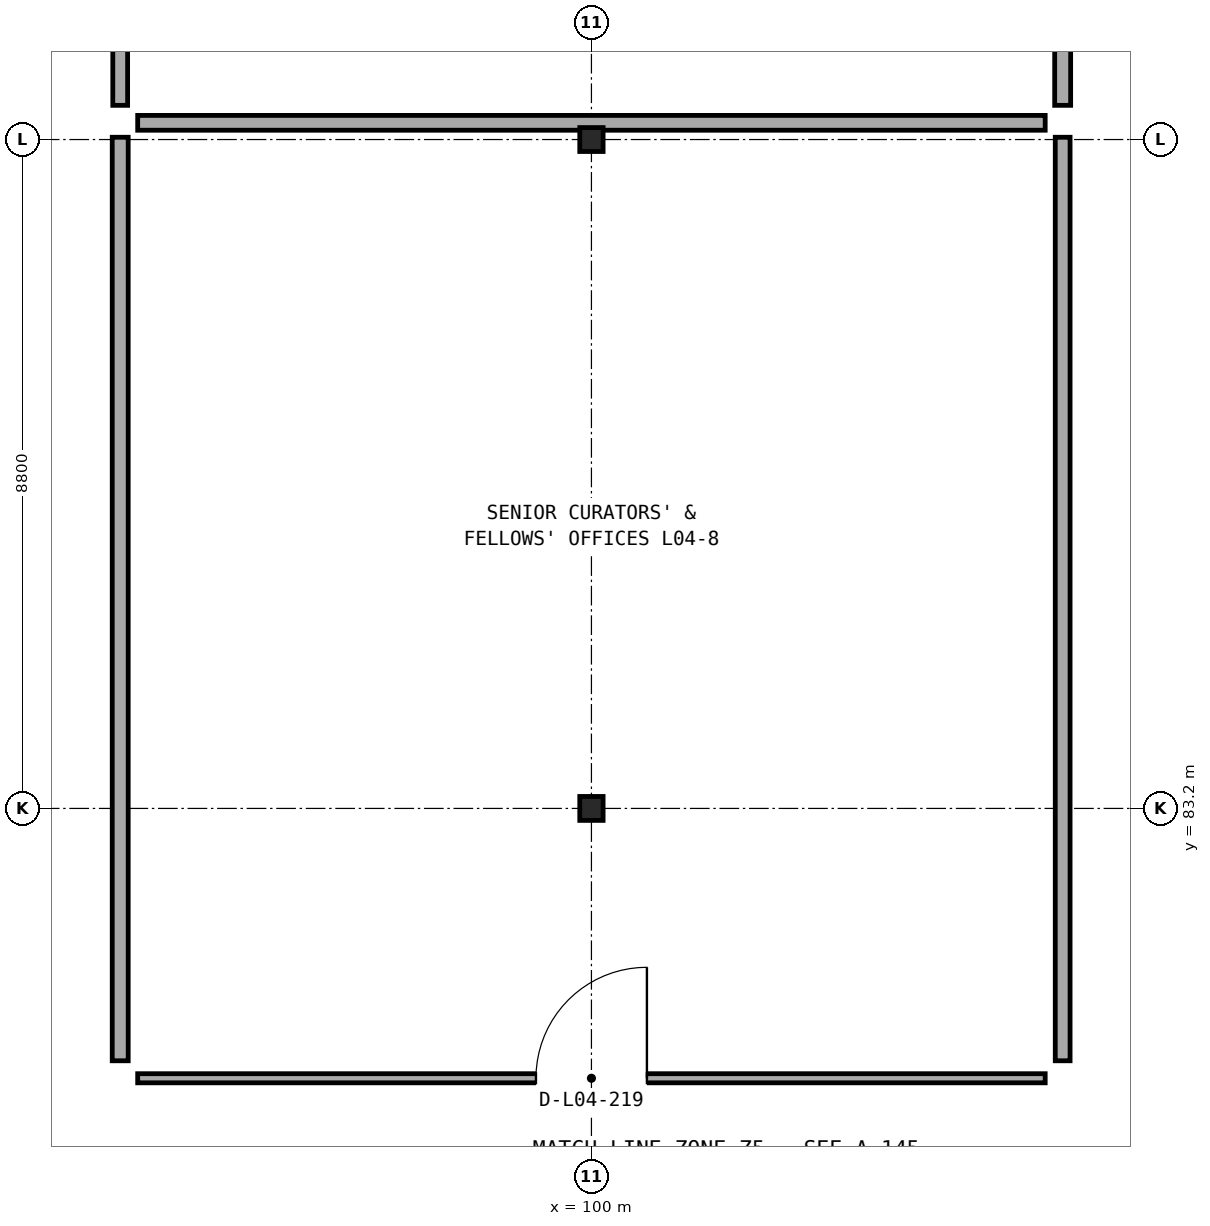
"""IFC4 building model, lengths in metres.
Left out: names, types, materials, properties, quantities, classifications, styles, units other than length and angle.
Written with IfcOpenShell. Run it as: python <this file> out.ifc"""

import sys

from ifc_helpers import new_model, si_unit, direction, frame, frame_2d, origin, origin_2d, place, context, subcontext, project, spatial, rectangle, i_section, extrude, element, fill, save


model = new_model("IFC4")
c1 = context("Model", 3, precision=1e-05, world=origin(), true_north=direction((0.0, 1.0)))
c2 = subcontext(c1, "Body", "Model", "MODEL_VIEW")
j1 = project(units=[si_unit("LENGTHUNIT", "METRE"), si_unit("PLANEANGLEUNIT", "RADIAN")], contexts=[c1])
p1 = place(None, origin())
s1 = spatial("IfcSite", under=j1, at=p1, CompositionType="ELEMENT")
p2 = place(p1, origin())
s2 = spatial("IfcBuilding", under=s1, at=p2, CompositionType="ELEMENT")
p3 = place(p2, frame((0.0, 0.0, 19.1)))
s3 = spatial("IfcBuildingStorey", under=s2, at=p3, CompositionType="ELEMENT", Elevation=19.1)
for number, where, z_axis, x_axis in (
    (1, (100.0, 83.2, 0.0), (0.0, 0.0, 1.0), (1.0, 0.0, 0.0)),
    (2, (100.0, 92.0, 0.0), (0.0, 0.0, 1.0), (1.0, 0.0, 0.0)),
):
    element("IfcColumn", number, at=place(p3, frame(where, z_axis=z_axis, x_axis=x_axis)), inside=s3, PredefinedType="COLUMN", context=c2, shape_type="SweptSolid", body=[
        extrude(i_section(OverallWidth=0.307, OverallDepth=0.315, WebThickness=0.012, FlangeThickness=0.019, FilletRadius=0.017, at=origin_2d()), origin(), (0.0, 0.0, 1.0), 9.0),
    ])
p4 = place(p3, frame((106.2, 107.64, 0.0), z_axis=(0.0, 0.0, 1.0), x_axis=(0.0, -1.0, 0.0)))
e3 = element("IfcWall", 3, at=p4, inside=s3, PredefinedType="PARTITIONING", context=c2, shape_type="SweptSolid", body=[
    extrude(rectangle(XDim=15.19, YDim=0.21, at=frame_2d((7.595, 0.0))), origin(), (0.0, 0.0, 1.0), 8.187),
])
p5 = place(p3, frame((93.8, 92.45, 0.0), z_axis=(0.0, 0.0, 1.0), x_axis=(0.0, 1.0, 0.0)))
e4 = element("IfcWall", 4, at=p5, inside=s3, PredefinedType="PARTITIONING", context=c2, shape_type="SweptSolid", body=[
    extrude(rectangle(XDim=15.19, YDim=0.195, at=frame_2d((7.595, 0.0))), origin(), (0.0, 0.0, 1.0), 8.187),
])
p6 = place(p3, frame((105.97, 79.65, 0.0), z_axis=(0.0, 0.0, 1.0), x_axis=(-1.0, 0.0, 0.0)))
e5 = element("IfcWall", 5, at=p6, inside=s3, PredefinedType="PARTITIONING", context=c2, shape_type="SweptSolid", body=[
    extrude(rectangle(XDim=11.94, YDim=0.12, at=frame_2d((5.97, 0.0))), origin(), (0.0, 0.0, 1.0), 8.264),
])
p7 = place(p6, frame((5.24, 0.0, 0.0)))
e6 = element("IfcOpeningElement", 6, at=p7, cuts=e5, PredefinedType="OPENING", context=c2, shape_type="SweptSolid", body=[
    extrude(rectangle(XDim=1.46, YDim=2.46, at=frame_2d((0.73, 1.23))), frame((0.0, 0.07, 0.0), z_axis=(0.0, -1.0, 0.0), x_axis=(1.0, 0.0, 0.0)), (0.0, 0.0, 1.0), 0.14),
])
p8 = place(p3, frame((93.8, 79.88, 0.0), z_axis=(0.0, 0.0, 1.0), x_axis=(0.0, 1.0, 0.0)))
e7 = element("IfcWall", 7, at=p8, inside=s3, PredefinedType="PARTITIONING", context=c2, shape_type="SweptSolid", body=[
    extrude(rectangle(XDim=12.15, YDim=0.21, at=frame_2d((6.075, 0.0))), origin(), (0.0, 0.0, 1.0), 8.187),
])
p9 = place(p3, frame((106.2, 92.03, 0.0), z_axis=(0.0, 0.0, 1.0), x_axis=(0.0, -1.0, 0.0)))
e8 = element("IfcWall", 8, at=p9, inside=s3, PredefinedType="PARTITIONING", context=c2, shape_type="SweptSolid", body=[
    extrude(rectangle(XDim=12.15, YDim=0.195, at=frame_2d((6.075, 0.0))), origin(), (0.0, 0.0, 1.0), 8.187),
])
p10 = place(p3, frame((105.97, 92.22, 0.0), z_axis=(0.0, 0.0, 1.0), x_axis=(-1.0, 0.0, 0.0)))
e9 = element("IfcWall", 9, at=p10, inside=s3, PredefinedType="PARTITIONING", context=c2, shape_type="SweptSolid", body=[
    extrude(rectangle(XDim=11.94, YDim=0.195, at=frame_2d((5.97, 0.0))), origin(), (0.0, 0.0, 1.0), 8.187),
])
p11 = place(p7, frame((1.46, 0.0, 0.0), z_axis=(0.0, 0.0, 1.0), x_axis=(-1.0, 0.0, 0.0)))
e10 = element("IfcDoor", 10, at=p11, inside=s3, OperationType="SINGLE_SWING_LEFT", PredefinedType="DOOR", context=c2, shape_type="SweptSolid", body=[
    extrude(rectangle(XDim=1.46, YDim=2.46, at=frame_2d((0.73, 1.23))), frame((0.0, 0.025, 0.0), z_axis=(0.0, -1.0, 0.0), x_axis=(1.0, 0.0, 0.0)), (0.0, 0.0, 1.0), 0.05),
])
fill(e6, e10)
save(model, sys.argv[1])
